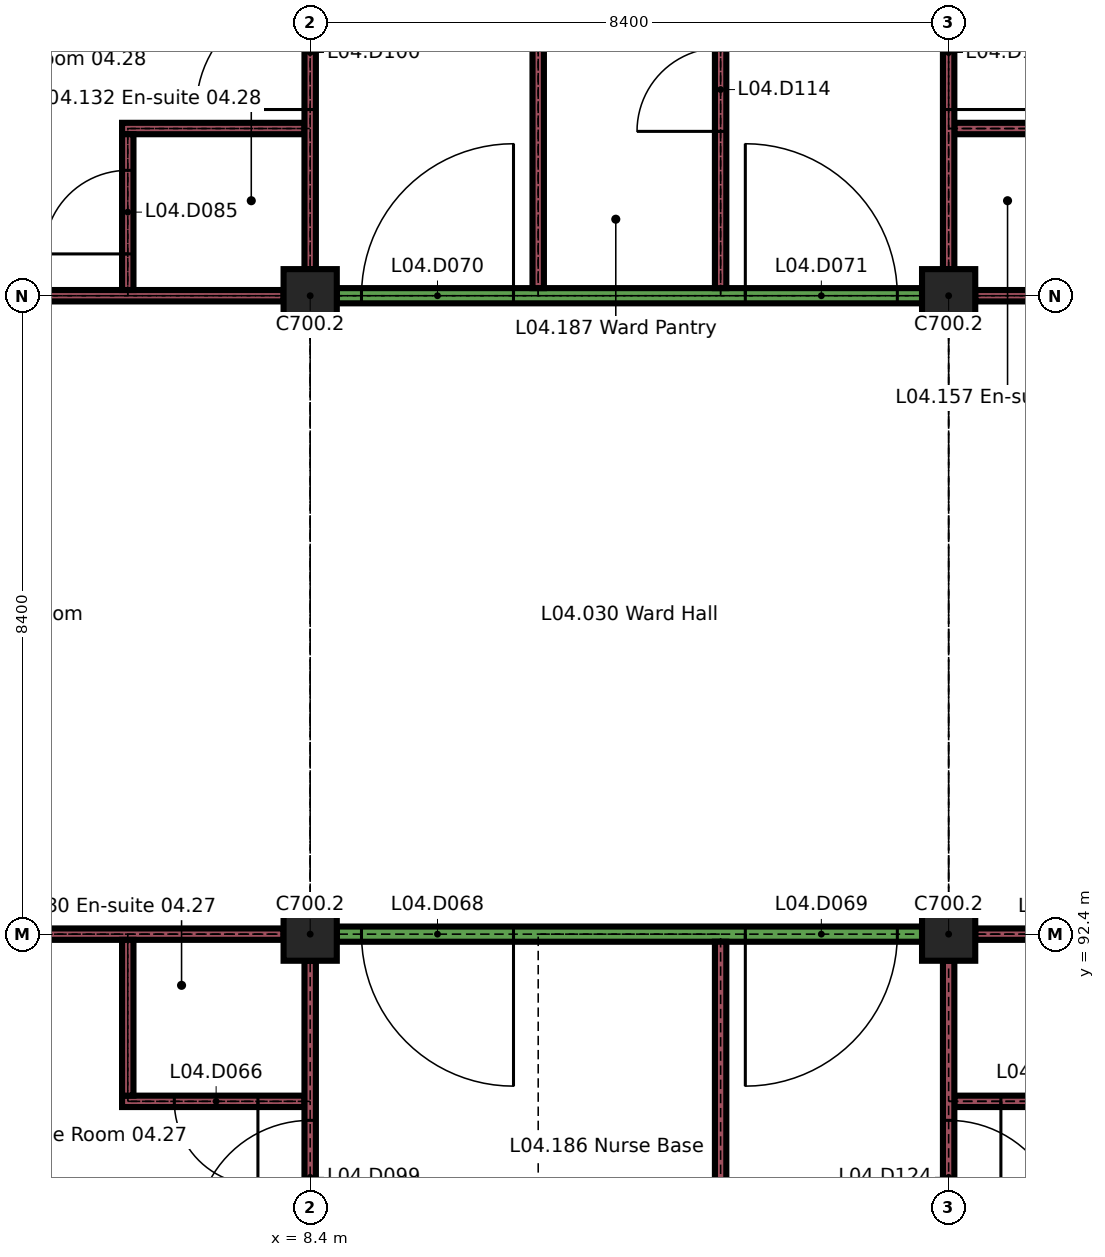
"""IFC4 building model, lengths in metres.
Left out: names, types, materials, properties, quantities, classifications, styles, units other than length and angle.
Written with IfcOpenShell. Run it as: python <this file> out.ifc"""

import sys

from ifc_helpers import new_model, si_unit, direction, frame, frame_2d, origin, origin_2d, place, context, subcontext, project, spatial, rectangle, extrude, element, fill, save


model = new_model("IFC4")
c1 = context("Model", 3, precision=1e-05, world=origin(), true_north=direction((0.0, 1.0)))
c2 = subcontext(c1, "Body", "Model", "MODEL_VIEW")
j1 = project(units=[si_unit("LENGTHUNIT", "METRE"), si_unit("PLANEANGLEUNIT", "RADIAN")], contexts=[c1])
p1 = place(None, origin())
s1 = spatial("IfcSite", under=j1, at=p1, CompositionType="ELEMENT")
p2 = place(p1, origin())
s2 = spatial("IfcBuilding", under=s1, at=p2, CompositionType="ELEMENT")
p3 = place(p2, frame((0.0, 0.0, 18.9)))
s3 = spatial("IfcBuildingStorey", under=s2, at=p3, CompositionType="ELEMENT", Elevation=18.9)
for number, where, z_axis, x_axis in (
    (1, (8.4, 92.4, 0.0), (0.0, 0.0, 1.0), (1.0, 0.0, 0.0)),
    (2, (16.8, 92.4, 0.0), (0.0, 0.0, 1.0), (1.0, 0.0, 0.0)),
    (3, (8.4, 100.8, 0.0), (0.0, 0.0, 1.0), (1.0, 0.0, 0.0)),
    (4, (16.8, 100.8, 0.0), (0.0, 0.0, 1.0), (1.0, 0.0, 0.0)),
):
    element("IfcColumn", number, at=place(p3, frame(where, z_axis=z_axis, x_axis=x_axis)), inside=s3, PredefinedType="COLUMN", context=c2, shape_type="SweptSolid", body=[
        extrude(rectangle(XDim=0.7, YDim=0.7, at=origin_2d()), origin(), (0.0, 0.0, 1.0), 3.26),
    ])
p4 = place(p3, frame((5.925, 90.2, 0.0), z_axis=(0.0, 0.0, 1.0), x_axis=(1.0, 0.0, 0.0)))
e5 = element("IfcWall", 5, at=p4, inside=s3, PredefinedType="PARTITIONING", context=c2, shape_type="SweptSolid", body=[
    extrude(rectangle(XDim=2.4, YDim=0.15, at=frame_2d((1.2, 0.0))), origin(), (0.0, 0.0, 1.0), 3.26),
])
p5 = place(p4, frame((0.688, 0.0, 0.0)))
e6 = element("IfcOpeningElement", 6, at=p5, cuts=e5, PredefinedType="OPENING", context=c2, shape_type="SweptSolid", body=[
    extrude(rectangle(XDim=1.1, YDim=2.1, at=frame_2d((0.55, 1.05))), frame((0.0, 0.085, 0.0), z_axis=(0.0, -1.0, 0.0), x_axis=(1.0, 0.0, 0.0)), (0.0, 0.0, 1.0), 0.17),
])
p6 = place(p3, frame((16.875, 90.2, 0.0), z_axis=(0.0, 0.0, 1.0), x_axis=(1.0, 0.0, 0.0)))
e7 = element("IfcWall", 7, at=p6, inside=s3, PredefinedType="PARTITIONING", context=c2, shape_type="SweptSolid", body=[
    extrude(rectangle(XDim=2.4, YDim=0.15, at=frame_2d((1.2, 0.0))), origin(), (0.0, 0.0, 1.0), 3.26),
])
p7 = place(p6, frame((0.613, 0.0, 0.0)))
e8 = element("IfcOpeningElement", 8, at=p7, cuts=e7, PredefinedType="OPENING", context=c2, shape_type="SweptSolid", body=[
    extrude(rectangle(XDim=1.1, YDim=2.1, at=frame_2d((0.55, 1.05))), frame((0.0, 0.085, 0.0), z_axis=(0.0, -1.0, 0.0), x_axis=(1.0, 0.0, 0.0)), (0.0, 0.0, 1.0), 0.17),
])
p8 = place(p3, frame((0.35, 92.4, 0.0), z_axis=(0.0, 0.0, 1.0), x_axis=(1.0, 0.0, 0.0)))
e9 = element("IfcWall", 9, at=p8, inside=s3, PredefinedType="PARTITIONING", context=c2, shape_type="SweptSolid", body=[
    extrude(rectangle(XDim=7.7, YDim=0.15, at=frame_2d((3.85, 0.0))), origin(), (0.0, 0.0, 1.0), 3.26),
])
p9 = place(p3, frame((8.75, 92.4, 0.0), z_axis=(0.0, 0.0, 1.0), x_axis=(1.0, 0.0, 0.0)))
e10 = element("IfcWall", 10, at=p9, inside=s3, PredefinedType="PARTITIONING", context=c2, shape_type="SweptSolid", body=[
    extrude(rectangle(XDim=7.7, YDim=0.2, at=frame_2d((3.85, 0.0))), origin(), (0.0, 0.0, 1.0), 3.26),
])
p10 = place(p9, frame((0.325, 0.0, 0.0)))
e11 = element("IfcOpeningElement", 11, at=p10, cuts=e10, PredefinedType="OPENING", context=c2, shape_type="SweptSolid", body=[
    extrude(rectangle(XDim=2.0, YDim=2.4, at=frame_2d((1.0, 1.2))), frame((0.0, 0.11, 0.0), z_axis=(0.0, -1.0, 0.0), x_axis=(1.0, 0.0, 0.0)), (0.0, 0.0, 1.0), 0.22),
])
p11 = place(p9, frame((5.375, 0.0, 0.0)))
e12 = element("IfcOpeningElement", 12, at=p11, cuts=e10, PredefinedType="OPENING", context=c2, shape_type="SweptSolid", body=[
    extrude(rectangle(XDim=2.0, YDim=2.4, at=frame_2d((1.0, 1.2))), frame((0.0, 0.11, 0.0), z_axis=(0.0, -1.0, 0.0), x_axis=(1.0, 0.0, 0.0)), (0.0, 0.0, 1.0), 0.22),
])
p12 = place(p3, frame((17.15, 92.4, 0.0), z_axis=(0.0, 0.0, 1.0), x_axis=(1.0, 0.0, 0.0)))
e13 = element("IfcWall", 13, at=p12, inside=s3, PredefinedType="PARTITIONING", context=c2, shape_type="SweptSolid", body=[
    extrude(rectangle(XDim=7.7, YDim=0.15, at=frame_2d((3.85, 0.0))), origin(), (0.0, 0.0, 1.0), 3.26),
])
p13 = place(p3, frame((0.35, 100.8, 0.0), z_axis=(0.0, 0.0, 1.0), x_axis=(1.0, 0.0, 0.0)))
e14 = element("IfcWall", 14, at=p13, inside=s3, PredefinedType="PARTITIONING", context=c2, shape_type="SweptSolid", body=[
    extrude(rectangle(XDim=7.7, YDim=0.15, at=frame_2d((3.85, 0.0))), origin(), (0.0, 0.0, 1.0), 3.26),
])
p14 = place(p3, frame((8.75, 100.8, 0.0), z_axis=(0.0, 0.0, 1.0), x_axis=(1.0, 0.0, 0.0)))
e15 = element("IfcWall", 15, at=p14, inside=s3, PredefinedType="PARTITIONING", context=c2, shape_type="SweptSolid", body=[
    extrude(rectangle(XDim=7.7, YDim=0.2, at=frame_2d((3.85, 0.0))), origin(), (0.0, 0.0, 1.0), 3.26),
])
p15 = place(p14, frame((0.325, 0.0, 0.0)))
e16 = element("IfcOpeningElement", 16, at=p15, cuts=e15, PredefinedType="OPENING", context=c2, shape_type="SweptSolid", body=[
    extrude(rectangle(XDim=2.0, YDim=2.4, at=frame_2d((1.0, 1.2))), frame((0.0, 0.11, 0.0), z_axis=(0.0, -1.0, 0.0), x_axis=(1.0, 0.0, 0.0)), (0.0, 0.0, 1.0), 0.22),
])
p16 = place(p14, frame((5.375, 0.0, 0.0)))
e17 = element("IfcOpeningElement", 17, at=p16, cuts=e15, PredefinedType="OPENING", context=c2, shape_type="SweptSolid", body=[
    extrude(rectangle(XDim=2.0, YDim=2.4, at=frame_2d((1.0, 1.2))), frame((0.0, 0.11, 0.0), z_axis=(0.0, -1.0, 0.0), x_axis=(1.0, 0.0, 0.0)), (0.0, 0.0, 1.0), 0.22),
])
p17 = place(p3, frame((17.15, 100.8, 0.0), z_axis=(0.0, 0.0, 1.0), x_axis=(1.0, 0.0, 0.0)))
e18 = element("IfcWall", 18, at=p17, inside=s3, PredefinedType="PARTITIONING", context=c2, shape_type="SweptSolid", body=[
    extrude(rectangle(XDim=7.7, YDim=0.15, at=frame_2d((3.85, 0.0))), origin(), (0.0, 0.0, 1.0), 3.26),
])
for number, where, z_axis, x_axis in (
    (19, (5.925, 103.0, 0.0), (0.0, 0.0, 1.0), (1.0, 0.0, 0.0)),
    (20, (16.875, 103.0, 0.0), (0.0, 0.0, 1.0), (1.0, 0.0, 0.0)),
):
    element("IfcWall", number, at=place(p3, frame(where, z_axis=z_axis, x_axis=x_axis)), inside=s3, PredefinedType="PARTITIONING", context=c2, shape_type="SweptSolid", body=[
        extrude(rectangle(XDim=2.4, YDim=0.15, at=frame_2d((1.2, 0.0))), origin(), (0.0, 0.0, 1.0), 3.26),
    ])
p18 = place(p3, frame((6.0, 90.275, 0.0), z_axis=(0.0, 0.0, 1.0), x_axis=(0.0, 1.0, 0.0)))
e21 = element("IfcWall", 21, at=p18, inside=s3, PredefinedType="PARTITIONING", context=c2, shape_type="SweptSolid", body=[
    extrude(rectangle(XDim=2.05, YDim=0.15, at=frame_2d((1.025, 0.0))), origin(), (0.0, 0.0, 1.0), 3.26),
])
p19 = place(p3, frame((6.0, 100.875, 0.0), z_axis=(0.0, 0.0, 1.0), x_axis=(0.0, 1.0, 0.0)))
e22 = element("IfcWall", 22, at=p19, inside=s3, PredefinedType="PARTITIONING", context=c2, shape_type="SweptSolid", body=[
    extrude(rectangle(XDim=2.05, YDim=0.15, at=frame_2d((1.025, 0.0))), origin(), (0.0, 0.0, 1.0), 3.26),
])
p20 = place(p19, frame((0.475, 0.0, 0.0)))
e23 = element("IfcOpeningElement", 23, at=p20, cuts=e22, PredefinedType="OPENING", context=c2, shape_type="SweptSolid", body=[
    extrude(rectangle(XDim=1.1, YDim=2.1, at=frame_2d((0.55, 1.05))), frame((0.0, 0.085, 0.0), z_axis=(0.0, -1.0, 0.0), x_axis=(1.0, 0.0, 0.0)), (0.0, 0.0, 1.0), 0.17),
])
p21 = place(p3, frame((8.4, 84.35, 0.0), z_axis=(0.0, 0.0, 1.0), x_axis=(0.0, 1.0, 0.0)))
e24 = element("IfcWall", 24, at=p21, inside=s3, PredefinedType="PARTITIONING", context=c2, shape_type="SweptSolid", body=[
    extrude(rectangle(XDim=7.7, YDim=0.15, at=frame_2d((3.85, 0.0))), origin(), (0.0, 0.0, 1.0), 3.26),
])
p22 = place(p21, frame((2.1, 0.0, 0.0)))
e25 = element("IfcOpeningElement", 25, at=p22, cuts=e24, PredefinedType="OPENING", context=c2, shape_type="SweptSolid", body=[
    extrude(rectangle(XDim=1.5, YDim=2.4, at=frame_2d((0.75, 1.2))), frame((0.0, 0.085, 0.0), z_axis=(0.0, -1.0, 0.0), x_axis=(1.0, 0.0, 0.0)), (0.0, 0.0, 1.0), 0.17),
])
p23 = place(p21, frame((4.1, 0.0, 0.0)))
e26 = element("IfcOpeningElement", 26, at=p23, cuts=e24, PredefinedType="OPENING", context=c2, shape_type="SweptSolid", body=[
    extrude(rectangle(XDim=1.5, YDim=2.4, at=frame_2d((0.75, 1.2))), frame((0.0, 0.085, 0.0), z_axis=(0.0, -1.0, 0.0), x_axis=(1.0, 0.0, 0.0)), (0.0, 0.0, 1.0), 0.17),
])
p24 = place(p3, frame((8.4, 101.15, 0.0), z_axis=(0.0, 0.0, 1.0), x_axis=(0.0, 1.0, 0.0)))
e27 = element("IfcWall", 27, at=p24, inside=s3, PredefinedType="PARTITIONING", context=c2, shape_type="SweptSolid", body=[
    extrude(rectangle(XDim=7.7, YDim=0.15, at=frame_2d((3.85, 0.0))), origin(), (0.0, 0.0, 1.0), 3.26),
])
p25 = place(p24, frame((2.1, 0.0, 0.0)))
e28 = element("IfcOpeningElement", 28, at=p25, cuts=e27, PredefinedType="OPENING", context=c2, shape_type="SweptSolid", body=[
    extrude(rectangle(XDim=1.5, YDim=2.4, at=frame_2d((0.75, 1.2))), frame((0.0, 0.085, 0.0), z_axis=(0.0, -1.0, 0.0), x_axis=(1.0, 0.0, 0.0)), (0.0, 0.0, 1.0), 0.17),
])
p26 = place(p24, frame((4.1, 0.0, 0.0)))
e29 = element("IfcOpeningElement", 29, at=p26, cuts=e27, PredefinedType="OPENING", context=c2, shape_type="SweptSolid", body=[
    extrude(rectangle(XDim=1.5, YDim=2.4, at=frame_2d((0.75, 1.2))), frame((0.0, 0.085, 0.0), z_axis=(0.0, -1.0, 0.0), x_axis=(1.0, 0.0, 0.0)), (0.0, 0.0, 1.0), 0.17),
])
p27 = place(p3, frame((11.4, 100.9, 0.0), z_axis=(0.0, 0.0, 1.0), x_axis=(0.0, 1.0, 0.0)))
e30 = element("IfcWall", 30, at=p27, inside=s3, PredefinedType="PARTITIONING", context=c2, shape_type="SweptSolid", body=[
    extrude(rectangle(XDim=5.225, YDim=0.15, at=frame_2d((2.613, 0.0))), origin(), (0.0, 0.0, 1.0), 3.26),
])
p28 = place(p3, frame((13.8, 33.7, 0.0), z_axis=(0.0, 0.0, 1.0), x_axis=(0.0, 1.0, 0.0)))
e31 = element("IfcWall", 31, at=p28, inside=s3, PredefinedType="PARTITIONING", context=c2, shape_type="SweptSolid", body=[
    extrude(rectangle(XDim=58.6, YDim=0.15, at=frame_2d((29.3, 0.0))), origin(), (0.0, 0.0, 1.0), 3.26),
])
p29 = place(p28, frame((12.6, 0.0, 0.0)))
e32 = element("IfcOpeningElement", 32, at=p29, cuts=e31, PredefinedType="OPENING", context=c2, shape_type="SweptSolid", body=[
    extrude(rectangle(XDim=1.2, YDim=2.1, at=frame_2d((0.6, 1.05))), frame((0.0, 0.085, 0.0), z_axis=(0.0, -1.0, 0.0), x_axis=(1.0, 0.0, 0.0)), (0.0, 0.0, 1.0), 0.17),
])
p30 = place(p28, frame((39.2, 0.0, 0.0)))
e33 = element("IfcOpeningElement", 33, at=p30, cuts=e31, PredefinedType="OPENING", context=c2, shape_type="SweptSolid", body=[
    extrude(rectangle(XDim=1.2, YDim=2.1, at=frame_2d((0.6, 1.05))), frame((0.0, 0.085, 0.0), z_axis=(0.0, -1.0, 0.0), x_axis=(1.0, 0.0, 0.0)), (0.0, 0.0, 1.0), 0.17),
])
p31 = place(p3, frame((13.8, 100.9, 0.0), z_axis=(0.0, 0.0, 1.0), x_axis=(0.0, 1.0, 0.0)))
e34 = element("IfcWall", 34, at=p31, inside=s3, PredefinedType="PARTITIONING", context=c2, shape_type="SweptSolid", body=[
    extrude(rectangle(XDim=5.225, YDim=0.15, at=frame_2d((2.613, 0.0))), origin(), (0.0, 0.0, 1.0), 3.26),
])
p32 = place(p31, frame((2.062, 0.0, 0.0)))
e35 = element("IfcOpeningElement", 35, at=p32, cuts=e34, PredefinedType="OPENING", context=c2, shape_type="SweptSolid", body=[
    extrude(rectangle(XDim=1.1, YDim=2.1, at=frame_2d((0.55, 1.05))), frame((0.0, 0.085, 0.0), z_axis=(0.0, -1.0, 0.0), x_axis=(1.0, 0.0, 0.0)), (0.0, 0.0, 1.0), 0.17),
])
p33 = place(p3, frame((16.8, 84.0, 0.0), z_axis=(0.0, 0.0, 1.0), x_axis=(0.0, 1.0, 0.0)))
e36 = element("IfcWall", 36, at=p33, inside=s3, PredefinedType="PARTITIONING", context=c2, shape_type="SweptSolid", body=[
    extrude(rectangle(XDim=8.05, YDim=0.15, at=frame_2d((4.025, 0.0))), origin(), (0.0, 0.0, 1.0), 3.26),
])
p34 = place(p33, frame((2.45, 0.0, 0.0)))
e37 = element("IfcOpeningElement", 37, at=p34, cuts=e36, PredefinedType="OPENING", context=c2, shape_type="SweptSolid", body=[
    extrude(rectangle(XDim=1.5, YDim=2.4, at=frame_2d((0.75, 1.2))), frame((0.0, 0.085, 0.0), z_axis=(0.0, -1.0, 0.0), x_axis=(1.0, 0.0, 0.0)), (0.0, 0.0, 1.0), 0.17),
])
p35 = place(p33, frame((4.45, 0.0, 0.0)))
e38 = element("IfcOpeningElement", 38, at=p35, cuts=e36, PredefinedType="OPENING", context=c2, shape_type="SweptSolid", body=[
    extrude(rectangle(XDim=1.5, YDim=2.4, at=frame_2d((0.75, 1.2))), frame((0.0, 0.085, 0.0), z_axis=(0.0, -1.0, 0.0), x_axis=(1.0, 0.0, 0.0)), (0.0, 0.0, 1.0), 0.17),
])
p36 = place(p3, frame((16.8, 101.15, 0.0), z_axis=(0.0, 0.0, 1.0), x_axis=(0.0, 1.0, 0.0)))
e39 = element("IfcWall", 39, at=p36, inside=s3, PredefinedType="PARTITIONING", context=c2, shape_type="SweptSolid", body=[
    extrude(rectangle(XDim=8.05, YDim=0.15, at=frame_2d((4.025, 0.0))), origin(), (0.0, 0.0, 1.0), 3.26),
])
p37 = place(p36, frame((2.1, 0.0, 0.0)))
e40 = element("IfcOpeningElement", 40, at=p37, cuts=e39, PredefinedType="OPENING", context=c2, shape_type="SweptSolid", body=[
    extrude(rectangle(XDim=1.5, YDim=2.4, at=frame_2d((0.75, 1.2))), frame((0.0, 0.085, 0.0), z_axis=(0.0, -1.0, 0.0), x_axis=(1.0, 0.0, 0.0)), (0.0, 0.0, 1.0), 0.17),
])
p38 = place(p36, frame((4.1, 0.0, 0.0)))
e41 = element("IfcOpeningElement", 41, at=p38, cuts=e39, PredefinedType="OPENING", context=c2, shape_type="SweptSolid", body=[
    extrude(rectangle(XDim=1.5, YDim=2.4, at=frame_2d((0.75, 1.2))), frame((0.0, 0.085, 0.0), z_axis=(0.0, -1.0, 0.0), x_axis=(1.0, 0.0, 0.0)), (0.0, 0.0, 1.0), 0.17),
])
p39 = place(p5, origin())
e42 = element("IfcDoor", 42, at=p39, inside=s3, OperationType="SINGLE_SWING_RIGHT", PredefinedType="DOOR", context=c2, shape_type="SweptSolid", body=[
    extrude(rectangle(XDim=1.1, YDim=2.1, at=frame_2d((0.55, 1.05))), frame((0.0, 0.025, 0.0), z_axis=(0.0, -1.0, 0.0), x_axis=(1.0, 0.0, 0.0)), (0.0, 0.0, 1.0), 0.05),
])
fill(e6, e42)
p40 = place(p7, origin())
e43 = element("IfcDoor", 43, at=p40, inside=s3, OperationType="SINGLE_SWING_LEFT", PredefinedType="DOOR", context=c2, shape_type="SweptSolid", body=[
    extrude(rectangle(XDim=1.1, YDim=2.1, at=frame_2d((0.55, 1.05))), frame((0.0, 0.025, 0.0), z_axis=(0.0, -1.0, 0.0), x_axis=(1.0, 0.0, 0.0)), (0.0, 0.0, 1.0), 0.05),
])
fill(e8, e43)
p41 = place(p10, origin())
e44 = element("IfcDoor", 44, at=p41, inside=s3, OperationType="SINGLE_SWING_RIGHT", PredefinedType="DOOR", context=c2, shape_type="SweptSolid", body=[
    extrude(rectangle(XDim=2.0, YDim=2.4, at=frame_2d((1.0, 1.2))), frame((0.0, 0.03, 0.0), z_axis=(0.0, -1.0, 0.0), x_axis=(1.0, 0.0, 0.0)), (0.0, 0.0, 1.0), 0.06),
])
fill(e11, e44)
p42 = place(p11, origin())
e45 = element("IfcDoor", 45, at=p42, inside=s3, OperationType="SINGLE_SWING_LEFT", PredefinedType="DOOR", context=c2, shape_type="SweptSolid", body=[
    extrude(rectangle(XDim=2.0, YDim=2.4, at=frame_2d((1.0, 1.2))), frame((0.0, 0.03, 0.0), z_axis=(0.0, -1.0, 0.0), x_axis=(1.0, 0.0, 0.0)), (0.0, 0.0, 1.0), 0.06),
])
fill(e12, e45)
p43 = place(p15, origin())
e46 = element("IfcDoor", 46, at=p43, inside=s3, OperationType="SINGLE_SWING_LEFT", PredefinedType="DOOR", context=c2, shape_type="SweptSolid", body=[
    extrude(rectangle(XDim=2.0, YDim=2.4, at=frame_2d((1.0, 1.2))), frame((0.0, 0.03, 0.0), z_axis=(0.0, -1.0, 0.0), x_axis=(1.0, 0.0, 0.0)), (0.0, 0.0, 1.0), 0.06),
])
fill(e16, e46)
p44 = place(p16, origin())
e47 = element("IfcDoor", 47, at=p44, inside=s3, OperationType="SINGLE_SWING_RIGHT", PredefinedType="DOOR", context=c2, shape_type="SweptSolid", body=[
    extrude(rectangle(XDim=2.0, YDim=2.4, at=frame_2d((1.0, 1.2))), frame((0.0, 0.03, 0.0), z_axis=(0.0, -1.0, 0.0), x_axis=(1.0, 0.0, 0.0)), (0.0, 0.0, 1.0), 0.06),
])
fill(e17, e47)
p45 = place(p20, origin())
e48 = element("IfcDoor", 48, at=p45, inside=s3, OperationType="SINGLE_SWING_RIGHT", PredefinedType="DOOR", context=c2, shape_type="SweptSolid", body=[
    extrude(rectangle(XDim=1.1, YDim=2.1, at=frame_2d((0.55, 1.05))), frame((0.0, 0.025, 0.0), z_axis=(0.0, -1.0, 0.0), x_axis=(1.0, 0.0, 0.0)), (0.0, 0.0, 1.0), 0.05),
])
fill(e23, e48)
p46 = place(p23, origin())
e49 = element("IfcDoor", 49, at=p46, inside=s3, OperationType="SINGLE_SWING_RIGHT", PredefinedType="DOOR", context=c2, shape_type="SweptSolid", body=[
    extrude(rectangle(XDim=1.5, YDim=2.4, at=frame_2d((0.75, 1.2))), frame((0.0, 0.03, 0.0), z_axis=(0.0, -1.0, 0.0), x_axis=(1.0, 0.0, 0.0)), (0.0, 0.0, 1.0), 0.06),
])
fill(e26, e49)
p47 = place(p25, origin())
e50 = element("IfcDoor", 50, at=p47, inside=s3, OperationType="SINGLE_SWING_RIGHT", PredefinedType="DOOR", context=c2, shape_type="SweptSolid", body=[
    extrude(rectangle(XDim=1.5, YDim=2.4, at=frame_2d((0.75, 1.2))), frame((0.0, 0.03, 0.0), z_axis=(0.0, -1.0, 0.0), x_axis=(1.0, 0.0, 0.0)), (0.0, 0.0, 1.0), 0.06),
])
fill(e28, e50)
p48 = place(p32, origin())
e51 = element("IfcDoor", 51, at=p48, inside=s3, OperationType="SINGLE_SWING_RIGHT", PredefinedType="DOOR", context=c2, shape_type="SweptSolid", body=[
    extrude(rectangle(XDim=1.1, YDim=2.1, at=frame_2d((0.55, 1.05))), frame((0.0, 0.025, 0.0), z_axis=(0.0, -1.0, 0.0), x_axis=(1.0, 0.0, 0.0)), (0.0, 0.0, 1.0), 0.05),
])
fill(e35, e51)
p49 = place(p35, origin())
e52 = element("IfcDoor", 52, at=p49, inside=s3, OperationType="SINGLE_SWING_LEFT", PredefinedType="DOOR", context=c2, shape_type="SweptSolid", body=[
    extrude(rectangle(XDim=1.5, YDim=2.4, at=frame_2d((0.75, 1.2))), frame((0.0, 0.03, 0.0), z_axis=(0.0, -1.0, 0.0), x_axis=(1.0, 0.0, 0.0)), (0.0, 0.0, 1.0), 0.06),
])
fill(e38, e52)
p50 = place(p37, origin())
e53 = element("IfcDoor", 53, at=p50, inside=s3, OperationType="SINGLE_SWING_LEFT", PredefinedType="DOOR", context=c2, shape_type="SweptSolid", body=[
    extrude(rectangle(XDim=1.5, YDim=2.4, at=frame_2d((0.75, 1.2))), frame((0.0, 0.03, 0.0), z_axis=(0.0, -1.0, 0.0), x_axis=(1.0, 0.0, 0.0)), (0.0, 0.0, 1.0), 0.06),
])
fill(e40, e53)
save(model, sys.argv[1])
